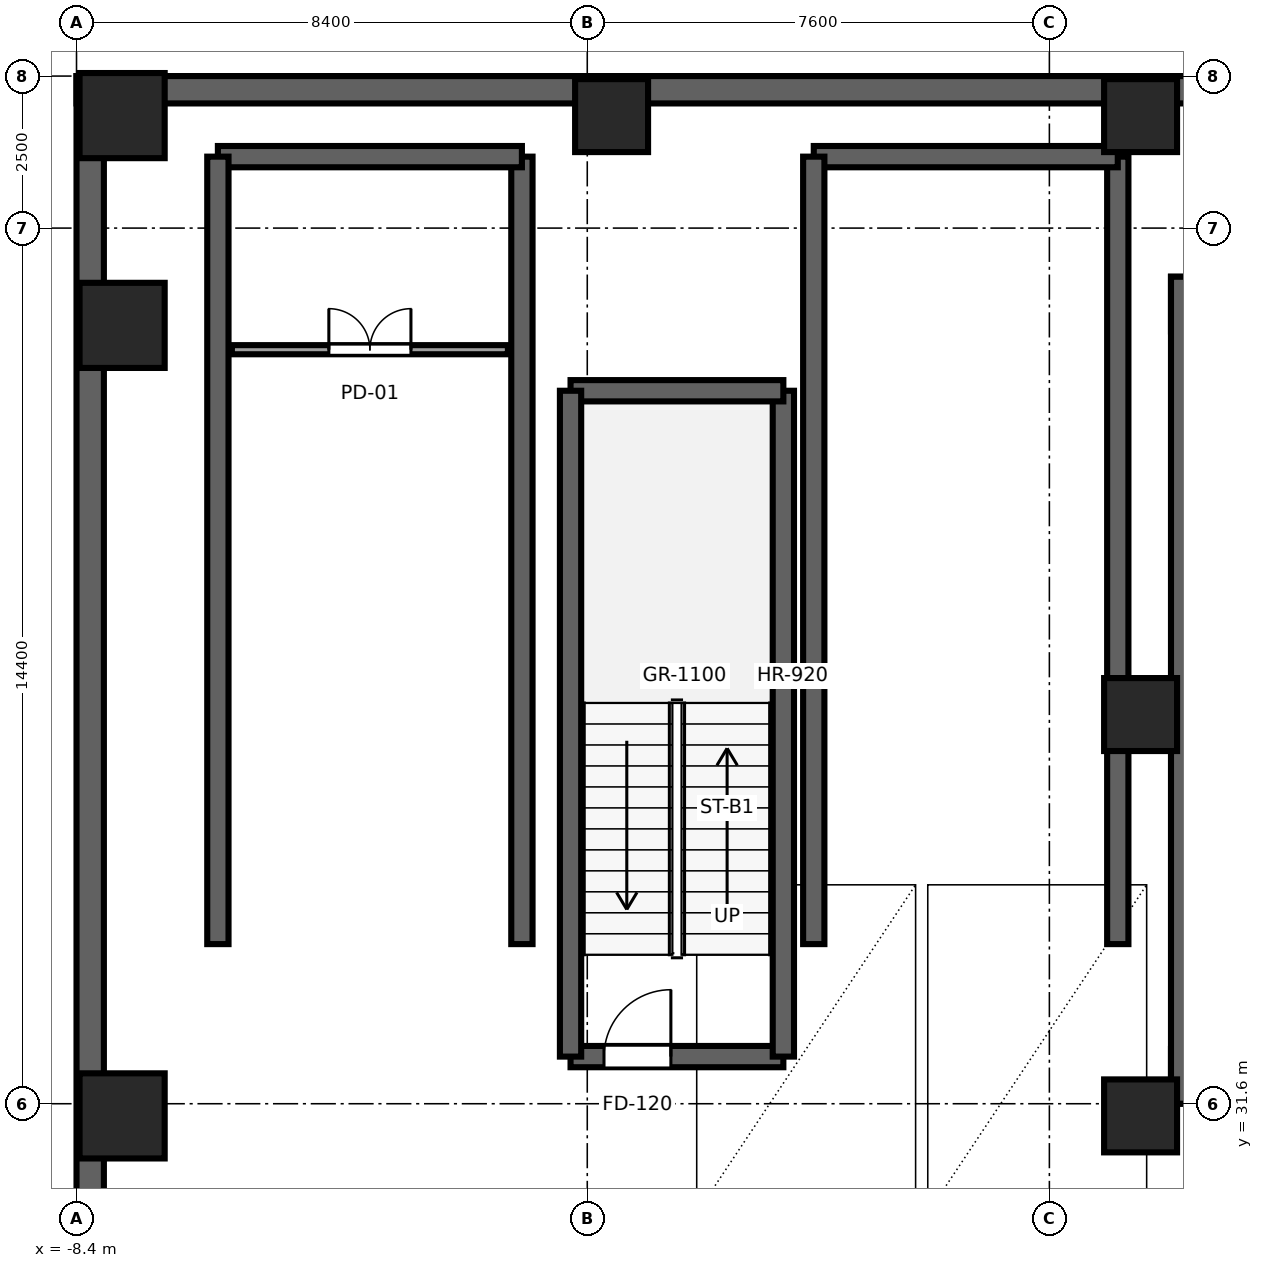
"""IFC4 building model, lengths in metres.
Left out: names, types, materials, properties, quantities, classifications, styles, units other than length and angle.
Written with IfcOpenShell. Run it as: python <this file> out.ifc"""

import sys

from ifc_helpers import new_model, si_unit, direction, frame, frame_2d, origin, origin_2d, place, context, subcontext, project, spatial, rectangle, extrude, source, transform, mapped, element, fill, save


model = new_model("IFC4")
c1 = context("Model", 3, precision=1e-05, world=origin(), true_north=direction((0.0, 1.0)))
c2 = subcontext(c1, "Body", "Model", "MODEL_VIEW")
j1 = project(units=[si_unit("LENGTHUNIT", "METRE"), si_unit("PLANEANGLEUNIT", "RADIAN")], contexts=[c1])
p1 = place(None, origin())
s1 = spatial("IfcSite", under=j1, at=p1, CompositionType="ELEMENT")
p2 = place(p1, origin())
s2 = spatial("IfcBuilding", under=s1, at=p2, CompositionType="ELEMENT")
p3 = place(p2, frame((0.0, 0.0, -9.6)))
s3 = spatial("IfcBuildingStorey", under=s2, at=p3, CompositionType="ELEMENT", Elevation=-9.6)
p4 = place(p3, frame((9.6, 32.05, 0.0), z_axis=(0.0, 0.0, 1.0), x_axis=(1.0, 0.0, 0.0)))
e1 = element("IfcWall", 1, at=p4, inside=s3, PredefinedType="SHEAR", context=c2, shape_type="SweptSolid", body=[
    extrude(rectangle(XDim=26.8, YDim=0.9, at=frame_2d((13.4, 0.0))), origin(), (0.0, 0.0, 1.0), 4.8),
])
p5 = place(p4, frame((7.85, 0.0, 0.0), z_axis=(0.0, 0.0, 1.0), x_axis=(-1.0, 0.0, 0.0)))
e2 = element("IfcOpeningElement", 2, at=p5, cuts=e1, PredefinedType="OPENING", context=c2, shape_type="SweptSolid", body=[
    extrude(rectangle(XDim=1.5, YDim=2.04, at=frame_2d((0.75, 1.02))), frame((0.0, 0.46, 0.0), z_axis=(0.0, -1.0, 0.0), x_axis=(1.0, 0.0, 0.0)), (0.0, 0.0, 1.0), 0.92),
])
p6 = place(p4, frame((14.15, 0.0, 0.0), z_axis=(0.0, 0.0, 1.0), x_axis=(-1.0, 0.0, 0.0)))
e3 = element("IfcOpeningElement", 3, at=p6, cuts=e1, PredefinedType="OPENING", context=c2, shape_type="SweptSolid", body=[
    extrude(rectangle(XDim=1.5, YDim=2.04, at=frame_2d((0.75, 1.02))), frame((0.0, 0.46, 0.0), z_axis=(0.0, -1.0, 0.0), x_axis=(1.0, 0.0, 0.0)), (0.0, 0.0, 1.0), 0.92),
])
p7 = place(p4, frame((21.25, 0.0, 0.0), z_axis=(0.0, 0.0, 1.0), x_axis=(-1.0, 0.0, 0.0)))
e4 = element("IfcOpeningElement", 4, at=p7, cuts=e1, PredefinedType="OPENING", context=c2, shape_type="SweptSolid", body=[
    extrude(rectangle(XDim=1.5, YDim=2.04, at=frame_2d((0.75, 1.02))), frame((0.0, 0.46, 0.0), z_axis=(0.0, -1.0, 0.0), x_axis=(1.0, 0.0, 0.0)), (0.0, 0.0, 1.0), 0.92),
])
p8 = place(p3, frame((9.6, 44.75, 0.0), z_axis=(0.0, 0.0, 1.0), x_axis=(1.0, 0.0, 0.0)))
e5 = element("IfcWall", 5, at=p8, inside=s3, PredefinedType="SHEAR", context=c2, shape_type="SweptSolid", body=[
    extrude(rectangle(XDim=26.8, YDim=0.9, at=frame_2d((13.4, 0.0))), origin(), (0.0, 0.0, 1.0), 4.8),
])
p9 = place(p3, frame((10.05, 31.6, 0.0), z_axis=(0.0, 0.0, 1.0), x_axis=(0.0, 1.0, 0.0)))
e6 = element("IfcWall", 6, at=p9, inside=s3, PredefinedType="SHEAR", context=c2, shape_type="SweptSolid", body=[
    extrude(rectangle(XDim=13.6, YDim=0.9, at=frame_2d((6.8, 0.0))), origin(), (0.0, 0.0, 1.0), 4.8),
])
p10 = place(p3, frame((-0.275, 32.375, 0.0), z_axis=(0.0, 0.0, 1.0), x_axis=(1.0, 0.0, 0.0)))
e7 = element("IfcWall", 7, at=p10, inside=s3, PredefinedType="SHEAR", context=c2, shape_type="SweptSolid", body=[
    extrude(rectangle(XDim=3.5, YDim=0.35, at=frame_2d((1.75, 0.0))), origin(), (0.0, 0.0, 1.0), 4.8),
])
p11 = place(p10, frame((0.55, 0.0, 0.0)))
e8 = element("IfcOpeningElement", 8, at=p11, cuts=e7, PredefinedType="OPENING", context=c2, shape_type="SweptSolid", body=[
    extrude(rectangle(XDim=1.1, YDim=2.12, at=frame_2d((0.55, 1.06))), frame((0.0, 0.185, 0.0), z_axis=(0.0, -1.0, 0.0), x_axis=(1.0, 0.0, 0.0)), (0.0, 0.0, 1.0), 0.37),
])
p12 = place(p3, frame((3.225, 32.375, 0.0), z_axis=(0.0, 0.0, 1.0), x_axis=(0.0, 1.0, 0.0)))
e9 = element("IfcWall", 9, at=p12, inside=s3, PredefinedType="SHEAR", context=c2, shape_type="SweptSolid", body=[
    extrude(rectangle(XDim=10.95, YDim=0.35, at=frame_2d((5.475, 0.0))), origin(), (0.0, 0.0, 1.0), 4.8),
])
p13 = place(p3, frame((3.225, 43.325, 0.0), z_axis=(0.0, 0.0, 1.0), x_axis=(-1.0, 0.0, 0.0)))
e10 = element("IfcWall", 10, at=p13, inside=s3, PredefinedType="SHEAR", context=c2, shape_type="SweptSolid", body=[
    extrude(rectangle(XDim=3.5, YDim=0.35, at=frame_2d((1.75, 0.0))), origin(), (0.0, 0.0, 1.0), 4.8),
])
p14 = place(p3, frame((-0.275, 43.325, 0.0), z_axis=(0.0, 0.0, 1.0), x_axis=(0.0, -1.0, 0.0)))
e11 = element("IfcWall", 11, at=p14, inside=s3, PredefinedType="SHEAR", context=c2, shape_type="SweptSolid", body=[
    extrude(rectangle(XDim=10.95, YDim=0.35, at=frame_2d((5.475, 0.0))), origin(), (0.0, 0.0, 1.0), 4.8),
])
p15 = place(p3, frame((-1.075, 34.225, 0.0), z_axis=(0.0, 0.0, 1.0), x_axis=(0.0, 1.0, 0.0)))
e12 = element("IfcWall", 12, at=p15, inside=s3, PredefinedType="SHEAR", context=c2, shape_type="SweptSolid", body=[
    extrude(rectangle(XDim=12.95, YDim=0.35, at=frame_2d((6.475, 0.0))), origin(), (0.0, 0.0, 1.0), 4.8),
])
p16 = place(p3, frame((-1.075, 47.175, 0.0), z_axis=(0.0, 0.0, 1.0), x_axis=(-1.0, 0.0, 0.0)))
e13 = element("IfcWall", 13, at=p16, inside=s3, PredefinedType="SHEAR", context=c2, shape_type="SweptSolid", body=[
    extrude(rectangle(XDim=5.0, YDim=0.35, at=frame_2d((2.5, 0.0))), origin(), (0.0, 0.0, 1.0), 4.8),
])
for number, where, z_axis, x_axis in (
    (14, (-6.075, 47.175, 0.0), (0.0, 0.0, 1.0), (0.0, -1.0, 0.0)),
    (15, (8.725, 34.225, 0.0), (0.0, 0.0, 1.0), (0.0, 1.0, 0.0)),
):
    element("IfcWall", number, at=place(p3, frame(where, z_axis=z_axis, x_axis=x_axis)), inside=s3, PredefinedType="SHEAR", context=c2, shape_type="SweptSolid", body=[
        extrude(rectangle(XDim=12.95, YDim=0.35, at=frame_2d((6.475, 0.0))), origin(), (0.0, 0.0, 1.0), 4.8),
    ])
p17 = place(p3, frame((8.725, 47.175, 0.0), z_axis=(0.0, 0.0, 1.0), x_axis=(-1.0, 0.0, 0.0)))
e16 = element("IfcWall", 16, at=p17, inside=s3, PredefinedType="SHEAR", context=c2, shape_type="SweptSolid", body=[
    extrude(rectangle(XDim=5.0, YDim=0.35, at=frame_2d((2.5, 0.0))), origin(), (0.0, 0.0, 1.0), 4.8),
])
p18 = place(p3, frame((3.725, 47.175, 0.0), z_axis=(0.0, 0.0, 1.0), x_axis=(0.0, -1.0, 0.0)))
e17 = element("IfcWall", 17, at=p18, inside=s3, PredefinedType="SHEAR", context=c2, shape_type="SweptSolid", body=[
    extrude(rectangle(XDim=12.95, YDim=0.35, at=frame_2d((6.475, 0.0))), origin(), (0.0, 0.0, 1.0), 4.8),
])
p19 = place(p3, frame((-8.4, 48.275, 0.0), z_axis=(0.0, 0.0, 1.0), x_axis=(1.0, 0.0, 0.0)))
e18 = element("IfcWall", 18, at=p19, inside=s3, PredefinedType="SOLIDWALL", context=c2, shape_type="SweptSolid", body=[
    extrude(rectangle(XDim=73.8, YDim=0.45, at=frame_2d((36.9, 0.0))), origin(), (0.0, 0.0, 1.0), 4.8),
])
p20 = place(p3, frame((-8.175, -2.5, 0.0), z_axis=(0.0, 0.0, 1.0), x_axis=(0.0, 1.0, 0.0)))
e19 = element("IfcWall", 19, at=p20, inside=s3, PredefinedType="SOLIDWALL", context=c2, shape_type="SweptSolid", body=[
    extrude(rectangle(XDim=51.0, YDim=0.45, at=frame_2d((25.5, 0.0))), origin(), (0.0, 0.0, 1.0), 4.8),
])
m1 = source(origin(), c2, "Body", "SweptSolid", [
    extrude(rectangle(XDim=1.4, YDim=1.4, at=origin_2d()), origin(), (0.0, 0.0, 1.0), 4.8),
])
for number, where, z_axis, x_axis in (
    (20, (-7.65, 31.4, 0.0), (0.0, 0.0, 1.0), (1.0, 0.0, 0.0)),
    (21, (-7.65, 44.4, 0.0), (0.0, 0.0, 1.0), (1.0, 0.0, 0.0)),
    (22, (-7.65, 47.85, 0.0), (0.0, 0.0, 1.0), (1.0, 0.0, 0.0)),
):
    element("IfcColumn", number, at=place(p3, frame(where, z_axis=z_axis, x_axis=x_axis)), inside=s3, PredefinedType="COLUMN", context=c2, shape_type="MappedRepresentation", body=[
        mapped(m1, transform((0.0, 0.0, 0.0), x_axis=(1.0, 0.0, 0.0), y_axis=(0.0, 1.0, 0.0), z_axis=(0.0, 0.0, 1.0), scale=1.0)),
    ])
m2 = source(origin(), c2, "Body", "SweptSolid", [
    extrude(rectangle(XDim=1.2, YDim=1.2, at=origin_2d()), origin(), (0.0, 0.0, 1.0), 4.8),
])
for number, where, z_axis, x_axis in (
    (23, (0.4, 47.85, 0.0), (0.0, 0.0, 1.0), (1.0, 0.0, 0.0)),
    (24, (9.1, 47.85, 0.0), (0.0, 0.0, 1.0), (1.0, 0.0, 0.0)),
    (25, (9.1, 38.0, 0.0), (0.0, 0.0, 1.0), (1.0, 0.0, 0.0)),
    (26, (9.1, 31.4, 0.0), (0.0, 0.0, 1.0), (1.0, 0.0, 0.0)),
):
    element("IfcColumn", number, at=place(p3, frame(where, z_axis=z_axis, x_axis=x_axis)), inside=s3, PredefinedType="COLUMN", context=c2, shape_type="MappedRepresentation", body=[
        mapped(m2, transform((0.0, 0.0, 0.0), x_axis=(1.0, 0.0, 0.0), y_axis=(0.0, 1.0, 0.0), z_axis=(0.0, 0.0, 1.0), scale=1.0)),
    ])
p21 = place(p3, frame((-5.845, 44.0, 0.0), z_axis=(0.0, 0.0, 1.0), x_axis=(1.0, 0.0, 0.0)))
e27 = element("IfcWall", 27, at=p21, inside=s3, PredefinedType="PARTITIONING", context=c2, shape_type="SweptSolid", body=[
    extrude(rectangle(XDim=4.54, YDim=0.15, at=frame_2d((2.27, 0.0))), origin(), (0.0, 0.0, 1.0), 4.54),
])
p22 = place(p21, frame((1.595, 0.0, 0.0)))
e28 = element("IfcOpeningElement", 28, at=p22, cuts=e27, PredefinedType="OPENING", context=c2, shape_type="SweptSolid", body=[
    extrude(rectangle(XDim=1.35, YDim=2.15, at=frame_2d((0.675, 1.075))), frame((0.0, 0.085, 0.0), z_axis=(0.0, -1.0, 0.0), x_axis=(1.0, 0.0, 0.0)), (0.0, 0.0, 1.0), 0.17),
])
m3 = source(origin(), c2, "Body", "SweptSolid", [
    extrude(rectangle(XDim=1.1, YDim=2.12, at=frame_2d((0.55, 1.06))), frame((0.0, 0.025, 0.0), z_axis=(0.0, -1.0, 0.0), x_axis=(1.0, 0.0, 0.0)), (0.0, 0.0, 1.0), 0.05),
])
p23 = place(p11, origin())
e29 = element("IfcDoor", 29, at=p23, inside=s3, OperationType="SINGLE_SWING_RIGHT", PredefinedType="DOOR", context=c2, shape_type="MappedRepresentation", body=[
    mapped(m3, transform((0.0, 0.0, 0.0), x_axis=(1.0, 0.0, 0.0), y_axis=(0.0, 1.0, 0.0), z_axis=(0.0, 0.0, 1.0), scale=1.0)),
])
fill(e8, e29)
m4 = source(origin(), c2, "Body", "SweptSolid", [
    extrude(rectangle(XDim=1.35, YDim=2.15, at=frame_2d((0.675, 1.075))), frame((0.0, 0.025, 0.0), z_axis=(0.0, -1.0, 0.0), x_axis=(1.0, 0.0, 0.0)), (0.0, 0.0, 1.0), 0.05),
])
p24 = place(p22, origin())
e30 = element("IfcDoor", 30, at=p24, inside=s3, OperationType="DOUBLE_DOOR_SINGLE_SWING", PredefinedType="DOOR", context=c2, shape_type="MappedRepresentation", body=[
    mapped(m4, transform((0.0, 0.0, 0.0), x_axis=(1.0, 0.0, 0.0), y_axis=(0.0, 1.0, 0.0), z_axis=(0.0, 0.0, 1.0), scale=1.0)),
])
fill(e28, e30)
save(model, sys.argv[1])
